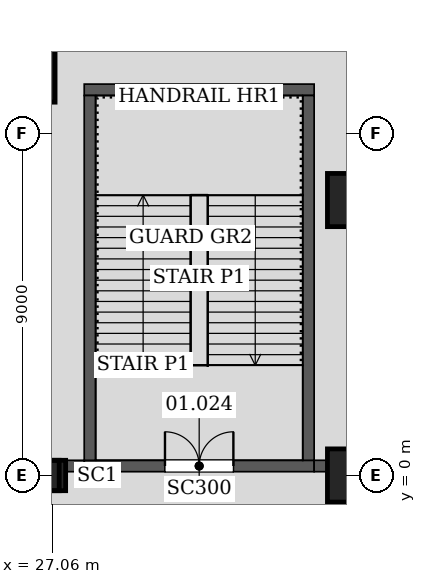
"""IFC4 building model, lengths in metres.
Left out: names, types, materials, properties, quantities, classifications, styles, units other than length and angle.
Written with IfcOpenShell. Run it as: python <this file> out.ifc"""

import sys

from ifc_helpers import new_model, si_unit, direction, frame, frame_2d, origin, origin_2d, place, context, subcontext, project, spatial, rectangle, hollow_rectangle, extrude, element, fill, save


model = new_model("IFC4")
c1 = context("Model", 3, precision=1e-05, world=origin(), true_north=direction((0.0, 1.0)))
c2 = subcontext(c1, "Body", "Model", "MODEL_VIEW")
j1 = project(units=[si_unit("LENGTHUNIT", "METRE"), si_unit("PLANEANGLEUNIT", "RADIAN")], contexts=[c1])
p1 = place(None, origin())
s1 = spatial("IfcSite", under=j1, at=p1, CompositionType="ELEMENT")
p2 = place(p1, origin())
s2 = spatial("IfcBuilding", under=s1, at=p2, CompositionType="ELEMENT")
p3 = place(p2, frame((0.0, 0.0, 7.2)))
s3 = spatial("IfcBuildingStorey", under=s2, at=p3, CompositionType="ELEMENT", Elevation=7.2)
p4 = place(p3, frame((26.133, 10.824, 0.0), z_axis=(-0.028266381762, -0.011713263234, 0.999531795956), x_axis=(0.38282136346, -0.923822387517, 0.0)))
e1 = element("IfcColumn", 1, at=p4, inside=s3, PredefinedType="COLUMN", context=c2, shape_type="SweptSolid", body=[
    extrude(hollow_rectangle(XDim=2.0, YDim=2.0, WallThickness=0.09, at=origin_2d()), origin(), (0.0, 0.0, 1.0), 6.003),
])
p5 = place(p3, frame((27.011, 0.0, 0.0), z_axis=(-0.028268321043, 0.0, 0.999600371161), x_axis=(0.0, -1.0, 0.0)))
e2 = element("IfcColumn", 2, at=p5, inside=s3, PredefinedType="COLUMN", context=c2, shape_type="SweptSolid", body=[
    extrude(hollow_rectangle(XDim=0.8, YDim=0.8, WallThickness=0.05, at=origin_2d()), origin(), (0.0, 0.0, 1.0), 6.002),
])
for number, where, z_axis, x_axis in (
    (3, (35.0, 0.0, 0.0), (0.0, 0.0, 1.0), (1.0, 0.0, 0.0)),
    (4, (35.0, 7.249, 0.0), (0.0, 0.0, 1.0), (1.0, 0.0, 0.0)),
):
    element("IfcColumn", number, at=place(p3, frame(where, z_axis=z_axis, x_axis=x_axis)), inside=s3, PredefinedType="COLUMN", context=c2, shape_type="SweptSolid", body=[
        extrude(rectangle(XDim=1.4, YDim=1.4, at=origin_2d()), origin(), (0.0, 0.0, 1.0), 6.0),
    ])
p6 = place(p3, frame((27.9, 0.25, 0.0), z_axis=(0.0, 0.0, 1.0), x_axis=(1.0, 0.0, 0.0)))
e5 = element("IfcWall", 5, at=p6, inside=s3, PredefinedType="SOLIDWALL", context=c2, shape_type="SweptSolid", body=[
    extrude(rectangle(XDim=6.05, YDim=0.3, at=frame_2d((3.025, 0.0))), origin(), (0.0, 0.0, 1.0), 6.0),
])
p7 = place(p6, frame((2.125, 0.0, 0.0)))
e6 = element("IfcOpeningElement", 6, at=p7, cuts=e5, PredefinedType="OPENING", context=c2, shape_type="SweptSolid", body=[
    extrude(rectangle(XDim=1.8, YDim=2.1, at=frame_2d((0.9, 1.05))), frame((0.0, 0.16, 0.0), z_axis=(0.0, -1.0, 0.0), x_axis=(1.0, 0.0, 0.0)), (0.0, 0.0, 1.0), 0.32),
])
p8 = place(p3, frame((27.9, 0.25, 0.0), z_axis=(0.0, 0.0, 1.0), x_axis=(-1.0, 0.0, 0.0)))
e7 = element("IfcWall", 7, at=p8, inside=s3, PredefinedType="SOLIDWALL", context=c2, shape_type="SweptSolid", body=[
    extrude(rectangle(XDim=0.489, YDim=0.3, at=frame_2d((0.245, 0.0))), origin(), (0.0, 0.0, 1.0), 5.344),
])
p9 = place(p3, frame((33.95, 0.25, 0.0), z_axis=(0.0, 0.0, 1.0), x_axis=(1.0, 0.0, 0.0)))
e8 = element("IfcWall", 8, at=p9, inside=s3, PredefinedType="SOLIDWALL", context=c2, shape_type="SweptSolid", body=[
    extrude(rectangle(XDim=0.35, YDim=0.3, at=frame_2d((0.175, 0.0))), origin(), (0.0, 0.0, 1.0), 5.344),
])
p10 = place(p3, frame((33.95, 10.15, 0.0), z_axis=(0.0, 0.0, 1.0), x_axis=(-1.0, 0.0, 0.0)))
e9 = element("IfcWall", 9, at=p10, inside=s3, PredefinedType="SOLIDWALL", context=c2, shape_type="SweptSolid", body=[
    extrude(rectangle(XDim=6.05, YDim=0.3, at=frame_2d((3.025, 0.0))), origin(), (0.0, 0.0, 1.0), 6.0),
])
for number, where, z_axis, x_axis in (
    (10, (28.05, 10.0, 0.0), (0.0, 0.0, 1.0), (0.0, -1.0, 0.0)),
    (11, (33.8, 0.4, 0.0), (0.0, 0.0, 1.0), (0.0, 1.0, 0.0)),
):
    element("IfcWall", number, at=place(p3, frame(where, z_axis=z_axis, x_axis=x_axis)), inside=s3, PredefinedType="SOLIDWALL", context=c2, shape_type="SweptSolid", body=[
        extrude(rectangle(XDim=9.6, YDim=0.3, at=frame_2d((4.8, 0.0))), origin(), (0.0, 0.0, 1.0), 6.0),
    ])
p11 = place(p7, origin())
e12 = element("IfcDoor", 12, at=p11, inside=s3, OperationType="DOUBLE_DOOR_SINGLE_SWING", PredefinedType="DOOR", context=c2, shape_type="SweptSolid", body=[
    extrude(rectangle(XDim=1.8, YDim=2.1, at=frame_2d((0.9, 1.05))), frame((0.0, 0.025, 0.0), z_axis=(0.0, -1.0, 0.0), x_axis=(1.0, 0.0, 0.0)), (0.0, 0.0, 1.0), 0.05),
])
fill(e6, e12)
save(model, sys.argv[1])
